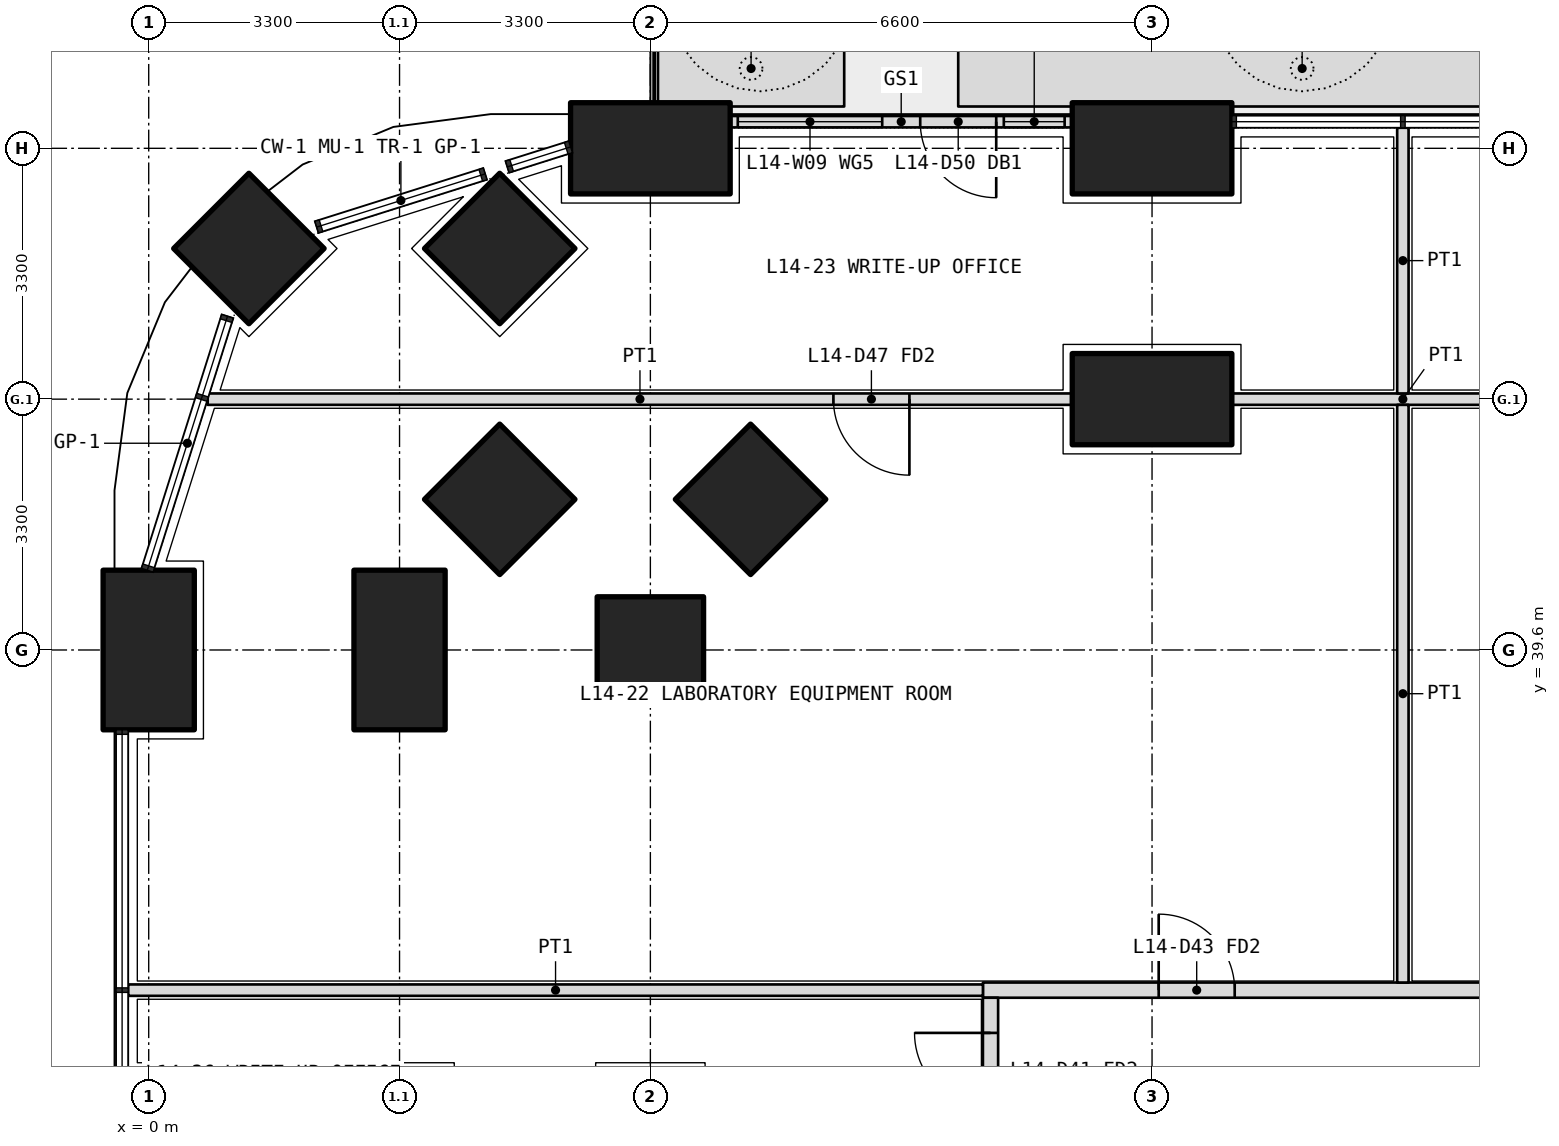
"""IFC4 building model, lengths in metres.
Left out: names, types, materials, properties, quantities, classifications, styles, units other than length and angle.
Written with IfcOpenShell. Run it as: python <this file> out.ifc"""

import sys

from ifc_helpers import new_model, si_unit, direction, frame, frame_2d, origin, origin_2d, place, context, subcontext, project, spatial, polyline, rectangle, outline, extrude, element, fill, save


model = new_model("IFC4")
c1 = context("Model", 3, precision=1e-05, world=origin(), true_north=direction((0.0, 1.0)))
c2 = subcontext(c1, "Body", "Model", "MODEL_VIEW")
j1 = project(units=[si_unit("LENGTHUNIT", "METRE"), si_unit("PLANEANGLEUNIT", "RADIAN")], contexts=[c1])
p1 = place(None, origin())
s1 = spatial("IfcSite", under=j1, at=p1, CompositionType="ELEMENT")
p2 = place(p1, origin())
s2 = spatial("IfcBuilding", under=s1, at=p2, CompositionType="ELEMENT")
p3 = place(p2, frame((0.0, 0.0, 63.3)))
s3 = spatial("IfcBuildingStorey", under=s2, at=p3, CompositionType="ELEMENT", Elevation=63.3)
p4 = place(p3, frame((1.318, 44.882, 0.0), z_axis=(0.0, 0.0, 1.0), x_axis=(0.707106781187, 0.707106781187, 0.0)))
e1 = element("IfcColumn", 1, at=p4, inside=s3, PredefinedType="COLUMN", context=c2, shape_type="SweptSolid", body=[
    extrude(rectangle(XDim=1.4, YDim=1.4, at=origin_2d()), origin(), (0.0, 0.0, 1.0), 4.2),
])
for number, where, z_axis, x_axis in (
    (2, (0.0, 39.6, 0.0), (0.0, 0.0, 1.0), (0.0, 1.0, 0.0)),
    (3, (6.6, 46.2, 0.0), (0.0, 0.0, 1.0), (1.0, 0.0, 0.0)),
    (4, (13.2, 46.2, 0.0), (0.0, 0.0, 1.0), (1.0, 0.0, 0.0)),
):
    element("IfcColumn", number, at=place(p3, frame(where, z_axis=z_axis, x_axis=x_axis)), inside=s3, PredefinedType="COLUMN", context=c2, shape_type="SweptSolid", body=[
        extrude(rectangle(XDim=2.1, YDim=1.2, at=origin_2d()), origin(), (0.0, 0.0, 1.0), 4.2),
    ])
for number, where, z_axis, x_axis in (
    (5, (6.6, 39.6, 0.0), (0.0, 0.0, 1.0), (1.0, 0.0, 0.0)),
    (6, (4.618, 44.882, 0.0), (0.0, 0.0, 1.0), (0.707, 0.707, 0.0)),
):
    element("IfcColumn", number, at=place(p3, frame(where, z_axis=z_axis, x_axis=x_axis)), inside=s3, PredefinedType="COLUMN", context=c2, shape_type="SweptSolid", body=[
        extrude(rectangle(XDim=1.4, YDim=1.4, at=origin_2d()), origin(), (0.0, 0.0, 1.0), 4.2),
    ])
p5 = place(p3, frame((3.3, 39.6, 0.0), z_axis=(0.0, 0.0, 1.0), x_axis=(0.0, 1.0, 0.0)))
e7 = element("IfcColumn", 7, at=p5, inside=s3, PredefinedType="COLUMN", context=c2, shape_type="SweptSolid", body=[
    extrude(rectangle(XDim=2.1, YDim=1.2, at=origin_2d()), origin(), (0.0, 0.0, 1.0), 4.2),
])
p6 = place(p3, frame((4.618, 41.582, 0.0), z_axis=(0.0, 0.0, 1.0), x_axis=(0.707106781187, 0.707106781187, 0.0)))
e8 = element("IfcColumn", 8, at=p6, inside=s3, PredefinedType="COLUMN", context=c2, shape_type="SweptSolid", body=[
    extrude(rectangle(XDim=1.4, YDim=1.4, at=origin_2d()), origin(), (0.0, 0.0, 1.0), 4.2),
])
p7 = place(p3, frame((13.2, 42.9, 0.0), z_axis=(0.0, 0.0, 1.0), x_axis=(1.0, 0.0, 0.0)))
e9 = element("IfcColumn", 9, at=p7, inside=s3, PredefinedType="COLUMN", context=c2, shape_type="SweptSolid", body=[
    extrude(rectangle(XDim=2.1, YDim=1.2, at=origin_2d()), origin(), (0.0, 0.0, 1.0), 4.2),
])
p8 = place(p3, frame((7.918, 41.582, 0.0), z_axis=(0.0, 0.0, 1.0), x_axis=(0.707106781187, 0.707106781187, 0.0)))
e10 = element("IfcColumn", 10, at=p8, inside=s3, PredefinedType="COLUMN", context=c2, shape_type="SweptSolid", body=[
    extrude(rectangle(XDim=1.4, YDim=1.4, at=origin_2d()), origin(), (0.0, 0.0, 1.0), 4.2),
])
p9 = place(p3, origin())
e11 = element("IfcWall", 11, at=p9, inside=s3, PredefinedType="USERDEFINED", context=c2, shape_type="SweptSolid", body=[
    extrude(outline(polyline([(6.7, 46.75), (9.15, 46.75), (9.15, 47.75), (6.7, 47.75), (6.7, 46.75)]), holes=[polyline([(6.85, 46.9), (9.0, 46.9), (9.0, 47.6), (6.85, 47.6), (6.85, 46.9)])]), origin(), (0.0, 0.0, 1.0), 1.05),
])
p10 = place(p3, origin())
e12 = element("IfcWall", 12, at=p10, inside=s3, PredefinedType="USERDEFINED", context=c2, shape_type="SweptSolid", body=[
    extrude(outline(polyline([(10.65, 46.75), (19.7, 46.75), (19.7, 47.75), (10.65, 47.75), (10.65, 46.75)]), holes=[polyline([(10.8, 46.9), (19.55, 46.9), (19.55, 47.6), (10.8, 47.6), (10.8, 46.9)])]), origin(), (0.0, 0.0, 1.0), 1.05),
])
p11 = place(p3, frame((12.15, 46.55, 0.0), z_axis=(0.0, 0.0, 1.0), x_axis=(-1.0, 0.0, 0.0)))
e13 = element("IfcWall", 13, at=p11, inside=s3, PredefinedType="SOLIDWALL", context=c2, shape_type="SweptSolid", body=[
    extrude(rectangle(XDim=4.5, YDim=0.15, at=frame_2d((2.25, 0.0))), origin(), (0.0, 0.0, 1.0), 2.6),
])
p12 = place(p11, frame((1.0, 0.0, 0.0)))
e14 = element("IfcOpeningElement", 14, at=p12, cuts=e13, PredefinedType="OPENING", context=c2, shape_type="SweptSolid", body=[
    extrude(rectangle(XDim=1.0, YDim=2.4, at=frame_2d((0.5, 1.2))), frame((0.0, 0.085, 0.0), z_axis=(0.0, -1.0, 0.0), x_axis=(1.0, 0.0, 0.0)), (0.0, 0.0, 1.0), 0.17),
])
p13 = place(p11, frame((0.1, 0.0, 0.1)))
e15 = element("IfcOpeningElement", 15, at=p13, cuts=e13, PredefinedType="OPENING", context=c2, shape_type="SweptSolid", body=[
    extrude(rectangle(XDim=0.8, YDim=2.2, at=frame_2d((0.4, 1.1))), frame((0.0, 0.085, 0.0), z_axis=(0.0, -1.0, 0.0), x_axis=(1.0, 0.0, 0.0)), (0.0, 0.0, 1.0), 0.17),
])
p14 = place(p11, frame((2.5, 0.0, 0.1)))
e16 = element("IfcOpeningElement", 16, at=p14, cuts=e13, PredefinedType="OPENING", context=c2, shape_type="SweptSolid", body=[
    extrude(rectangle(XDim=1.9, YDim=2.2, at=frame_2d((0.95, 1.1))), frame((0.0, 0.085, 0.0), z_axis=(0.0, -1.0, 0.0), x_axis=(1.0, 0.0, 0.0)), (0.0, 0.0, 1.0), 0.17),
])
p15 = place(p3, frame((10.975, 35.125, 0.0), z_axis=(0.0, 0.0, 1.0), x_axis=(1.0, 0.0, 0.0)))
e17 = element("IfcWall", 17, at=p15, inside=s3, PredefinedType="PARTITIONING", context=c2, shape_type="SweptSolid", body=[
    extrude(rectangle(XDim=30.85, YDim=0.2, at=frame_2d((15.425, 0.0))), origin(), (0.0, 0.0, 1.0), 2.85),
])
p16 = place(p15, frame((2.312, 0.0, 0.0)))
e18 = element("IfcOpeningElement", 18, at=p16, cuts=e17, PredefinedType="OPENING", context=c2, shape_type="SweptSolid", body=[
    extrude(rectangle(XDim=1.0, YDim=2.1, at=frame_2d((0.5, 1.05))), frame((0.0, 0.11, 0.0), z_axis=(0.0, -1.0, 0.0), x_axis=(1.0, 0.0, 0.0)), (0.0, 0.0, 1.0), 0.22),
])
p17 = place(p15, frame((13.175, 0.0, 0.0)))
e19 = element("IfcOpeningElement", 19, at=p17, cuts=e17, PredefinedType="OPENING", context=c2, shape_type="SweptSolid", body=[
    extrude(rectangle(XDim=1.2, YDim=2.1, at=frame_2d((0.6, 1.05))), frame((0.0, 0.11, 0.0), z_axis=(0.0, -1.0, 0.0), x_axis=(1.0, 0.0, 0.0)), (0.0, 0.0, 1.0), 0.22),
])
p18 = place(p15, frame((25.788, 0.0, 0.0)))
e20 = element("IfcOpeningElement", 20, at=p18, cuts=e17, PredefinedType="OPENING", context=c2, shape_type="SweptSolid", body=[
    extrude(rectangle(XDim=1.2, YDim=2.1, at=frame_2d((0.6, 1.05))), frame((0.0, 0.11, 0.0), z_axis=(0.0, -1.0, 0.0), x_axis=(1.0, 0.0, 0.0)), (0.0, 0.0, 1.0), 0.22),
])
p19 = place(p3, frame((11.075, 11.175, 0.0), z_axis=(0.0, 0.0, 1.0), x_axis=(0.0, 1.0, 0.0)))
e21 = element("IfcWall", 21, at=p19, inside=s3, PredefinedType="PARTITIONING", context=c2, shape_type="SweptSolid", body=[
    extrude(rectangle(XDim=23.85, YDim=0.2, at=frame_2d((11.925, 0.0))), origin(), (0.0, 0.0, 1.0), 2.85),
])
p20 = place(p19, frame((0.363, 0.0, 0.0)))
e22 = element("IfcOpeningElement", 22, at=p20, cuts=e21, PredefinedType="OPENING", context=c2, shape_type="SweptSolid", body=[
    extrude(rectangle(XDim=1.2, YDim=2.1, at=frame_2d((0.6, 1.05))), frame((0.0, 0.11, 0.0), z_axis=(0.0, -1.0, 0.0), x_axis=(1.0, 0.0, 0.0)), (0.0, 0.0, 1.0), 0.22),
])
p21 = place(p19, frame((2.575, 0.0, 0.0)))
e23 = element("IfcOpeningElement", 23, at=p21, cuts=e21, PredefinedType="OPENING", context=c2, shape_type="SweptSolid", body=[
    extrude(rectangle(XDim=1.0, YDim=2.1, at=frame_2d((0.5, 1.05))), frame((0.0, 0.11, 0.0), z_axis=(0.0, -1.0, 0.0), x_axis=(1.0, 0.0, 0.0)), (0.0, 0.0, 1.0), 0.22),
])
p22 = place(p19, frame((5.625, 0.0, 0.0)))
e24 = element("IfcOpeningElement", 24, at=p22, cuts=e21, PredefinedType="OPENING", context=c2, shape_type="SweptSolid", body=[
    extrude(rectangle(XDim=0.9, YDim=2.1, at=frame_2d((0.45, 1.05))), frame((0.0, 0.11, 0.0), z_axis=(0.0, -1.0, 0.0), x_axis=(1.0, 0.0, 0.0)), (0.0, 0.0, 1.0), 0.22),
])
p23 = place(p19, frame((9.425, 0.0, 0.0)))
e25 = element("IfcOpeningElement", 25, at=p23, cuts=e21, PredefinedType="OPENING", context=c2, shape_type="SweptSolid", body=[
    extrude(rectangle(XDim=0.9, YDim=2.1, at=frame_2d((0.45, 1.05))), frame((0.0, 0.11, 0.0), z_axis=(0.0, -1.0, 0.0), x_axis=(1.0, 0.0, 0.0)), (0.0, 0.0, 1.0), 0.22),
])
p24 = place(p19, frame((12.975, 0.0, 0.0)))
e26 = element("IfcOpeningElement", 26, at=p24, cuts=e21, PredefinedType="OPENING", context=c2, shape_type="SweptSolid", body=[
    extrude(rectangle(XDim=1.0, YDim=2.1, at=frame_2d((0.5, 1.05))), frame((0.0, 0.11, 0.0), z_axis=(0.0, -1.0, 0.0), x_axis=(1.0, 0.0, 0.0)), (0.0, 0.0, 1.0), 0.22),
])
p25 = place(p19, frame((18.025, 0.0, 0.0)))
e27 = element("IfcOpeningElement", 27, at=p25, cuts=e21, PredefinedType="OPENING", context=c2, shape_type="SweptSolid", body=[
    extrude(rectangle(XDim=1.0, YDim=2.1, at=frame_2d((0.5, 1.05))), frame((0.0, 0.11, 0.0), z_axis=(0.0, -1.0, 0.0), x_axis=(1.0, 0.0, 0.0)), (0.0, 0.0, 1.0), 0.22),
])
p26 = place(p19, frame((22.387, 0.0, 0.0)))
e28 = element("IfcOpeningElement", 28, at=p26, cuts=e21, PredefinedType="OPENING", context=c2, shape_type="SweptSolid", body=[
    extrude(rectangle(XDim=1.0, YDim=2.1, at=frame_2d((0.5, 1.05))), frame((0.0, 0.11, 0.0), z_axis=(0.0, -1.0, 0.0), x_axis=(1.0, 0.0, 0.0)), (0.0, 0.0, 1.0), 0.22),
])
p27 = place(p3, frame((-0.27, 35.125, 0.0), z_axis=(0.0, 0.0, 1.0), x_axis=(1.0, 0.0, 0.0)))
e29 = element("IfcWall", 29, at=p27, inside=s3, PredefinedType="PARTITIONING", context=c2, shape_type="SweptSolid", body=[
    extrude(rectangle(XDim=11.245, YDim=0.15, at=frame_2d((5.623, 0.0))), origin(), (0.0, 0.0, 1.0), 2.6),
])
p28 = place(p3, frame((18.75, 42.9, 0.0), z_axis=(0.0, 0.0, 1.0), x_axis=(-1.0, 0.0, 0.0)))
e30 = element("IfcWall", 30, at=p28, inside=s3, PredefinedType="PARTITIONING", context=c2, shape_type="SweptSolid", body=[
    extrude(rectangle(XDim=4.5, YDim=0.15, at=frame_2d((2.25, 0.0))), origin(), (0.0, 0.0, 1.0), 3.9),
])
p29 = place(p3, frame((12.15, 42.9, 0.0), z_axis=(0.0, 0.0, 1.0), x_axis=(-1.0, 0.0, 0.0)))
e31 = element("IfcWall", 31, at=p29, inside=s3, PredefinedType="PARTITIONING", context=c2, shape_type="SweptSolid", body=[
    extrude(rectangle(XDim=11.374, YDim=0.15, at=frame_2d((5.687, 0.0))), origin(), (0.0, 0.0, 1.0), 2.6),
])
p30 = place(p29, frame((2.142, 0.0, 0.0)))
e32 = element("IfcOpeningElement", 32, at=p30, cuts=e31, PredefinedType="OPENING", context=c2, shape_type="SweptSolid", body=[
    extrude(rectangle(XDim=1.0, YDim=2.1, at=frame_2d((0.5, 1.05))), frame((0.0, 0.085, 0.0), z_axis=(0.0, -1.0, 0.0), x_axis=(1.0, 0.0, 0.0)), (0.0, 0.0, 1.0), 0.17),
])
p31 = place(p3, frame((16.5, 46.47, 0.0), z_axis=(0.0, 0.0, 1.0), x_axis=(0.0, -1.0, 0.0)))
e33 = element("IfcWall", 33, at=p31, inside=s3, PredefinedType="PARTITIONING", context=c2, shape_type="SweptSolid", body=[
    extrude(rectangle(XDim=3.495, YDim=0.15, at=frame_2d((1.748, 0.0))), origin(), (0.0, 0.0, 1.0), 2.6),
])
p32 = place(p3, frame((16.5, 42.825, 0.0), z_axis=(0.0, 0.0, 1.0), x_axis=(0.0, -1.0, 0.0)))
e34 = element("IfcWall", 34, at=p32, inside=s3, PredefinedType="PARTITIONING", context=c2, shape_type="SweptSolid", body=[
    extrude(rectangle(XDim=7.6, YDim=0.15, at=frame_2d((3.8, 0.0))), origin(), (0.0, 0.0, 1.0), 3.9),
])
p33 = place(p12, origin())
e35 = element("IfcDoor", 35, at=p33, inside=s3, OperationType="SINGLE_SWING_LEFT", PredefinedType="DOOR", context=c2, shape_type="SweptSolid", body=[
    extrude(rectangle(XDim=1.0, YDim=2.4, at=frame_2d((0.5, 1.2))), frame((0.0, 0.025, 0.0), z_axis=(0.0, -1.0, 0.0), x_axis=(1.0, 0.0, 0.0)), (0.0, 0.0, 1.0), 0.05),
])
fill(e14, e35)
p34 = place(p13, origin())
e36 = element("IfcWindow", 36, at=p34, inside=s3, PartitioningType="SINGLE_PANEL", PredefinedType="WINDOW", context=c2, shape_type="SweptSolid", body=[
    extrude(rectangle(XDim=0.8, YDim=2.2, at=frame_2d((0.4, 1.1))), frame((0.0, 0.03, 0.0), z_axis=(0.0, -1.0, 0.0), x_axis=(1.0, 0.0, 0.0)), (0.0, 0.0, 1.0), 0.06),
])
fill(e15, e36)
p35 = place(p14, origin())
e37 = element("IfcWindow", 37, at=p35, inside=s3, PartitioningType="SINGLE_PANEL", PredefinedType="WINDOW", context=c2, shape_type="SweptSolid", body=[
    extrude(rectangle(XDim=1.9, YDim=2.2, at=frame_2d((0.95, 1.1))), frame((0.0, 0.03, 0.0), z_axis=(0.0, -1.0, 0.0), x_axis=(1.0, 0.0, 0.0)), (0.0, 0.0, 1.0), 0.06),
])
fill(e16, e37)
p36 = place(p16, origin())
e38 = element("IfcDoor", 38, at=p36, inside=s3, OperationType="SINGLE_SWING_LEFT", PredefinedType="DOOR", context=c2, shape_type="SweptSolid", body=[
    extrude(rectangle(XDim=1.0, YDim=2.1, at=frame_2d((0.5, 1.05))), frame((0.0, 0.025, 0.0), z_axis=(0.0, -1.0, 0.0), x_axis=(1.0, 0.0, 0.0)), (0.0, 0.0, 1.0), 0.05),
])
fill(e18, e38)
p37 = place(p30, origin())
e39 = element("IfcDoor", 39, at=p37, inside=s3, OperationType="SINGLE_SWING_LEFT", PredefinedType="DOOR", context=c2, shape_type="SweptSolid", body=[
    extrude(rectangle(XDim=1.0, YDim=2.1, at=frame_2d((0.5, 1.05))), frame((0.0, 0.025, 0.0), z_axis=(0.0, -1.0, 0.0), x_axis=(1.0, 0.0, 0.0)), (0.0, 0.0, 1.0), 0.05),
])
fill(e32, e39)
p38 = place(p26, origin())
e40 = element("IfcDoor", 40, at=p38, inside=s3, OperationType="SINGLE_SWING_RIGHT", PredefinedType="DOOR", context=c2, shape_type="SweptSolid", body=[
    extrude(rectangle(XDim=1.0, YDim=2.1, at=frame_2d((0.5, 1.05))), frame((0.0, 0.025, 0.0), z_axis=(0.0, -1.0, 0.0), x_axis=(1.0, 0.0, 0.0)), (0.0, 0.0, 1.0), 0.05),
])
fill(e28, e40)
save(model, sys.argv[1])
